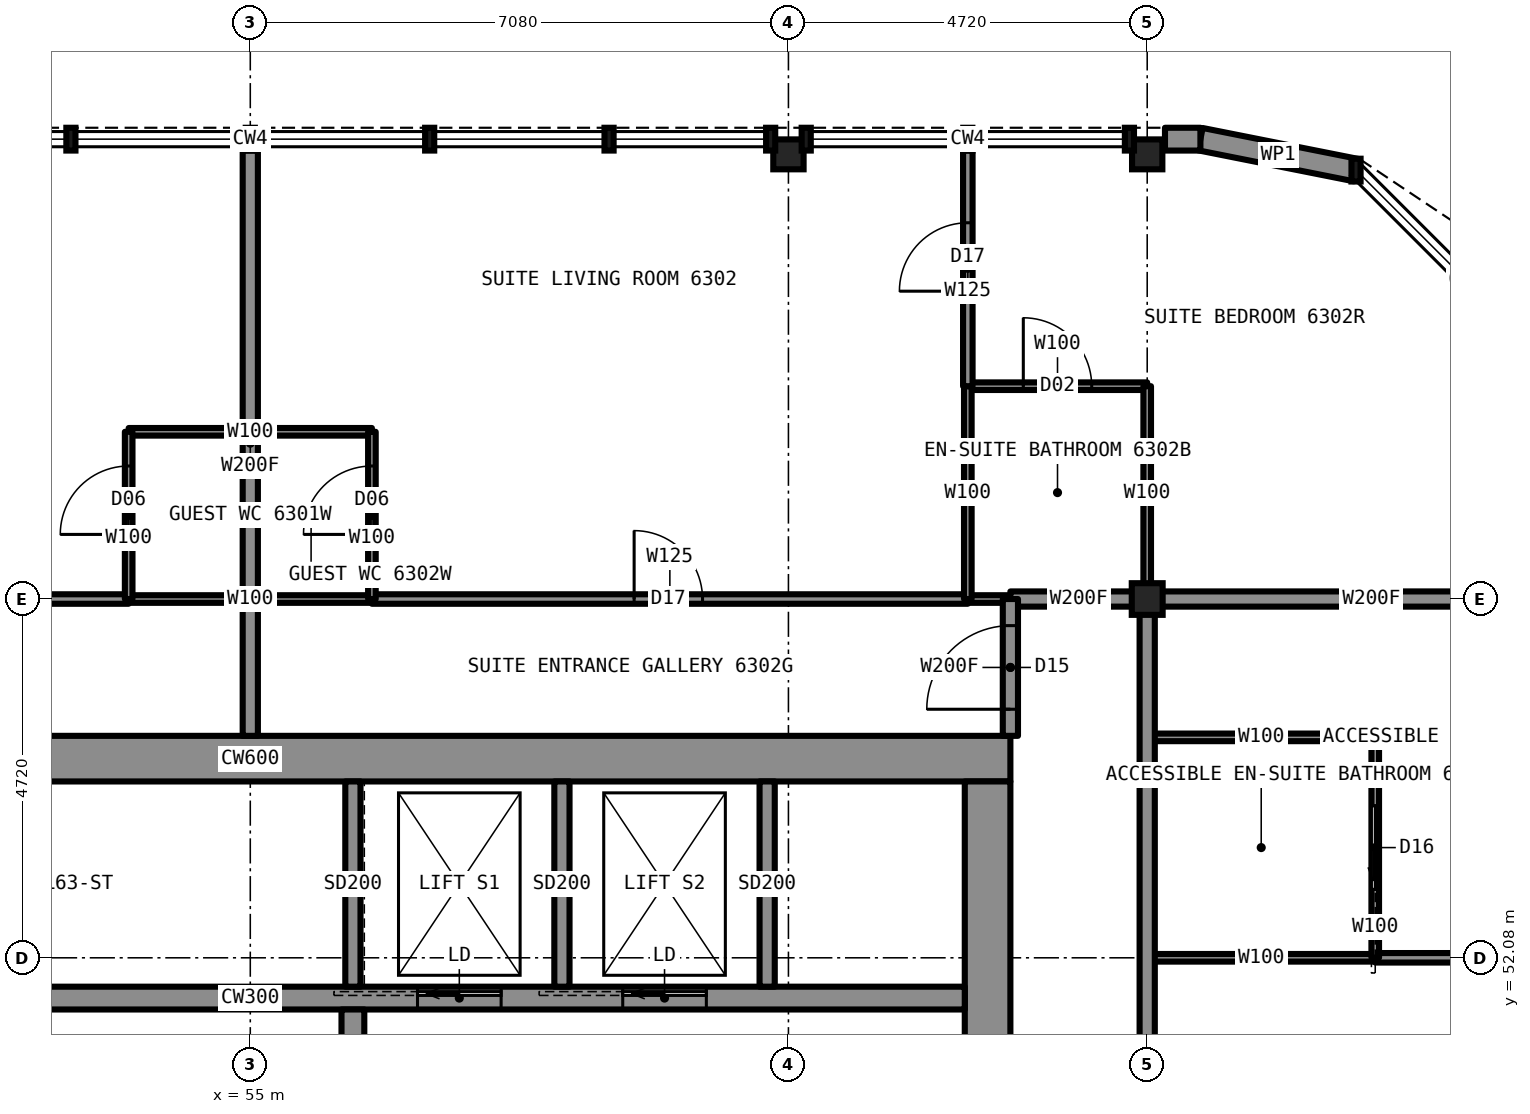
"""IFC4 building model, lengths in metres.
Left out: names, types, materials, properties, quantities, classifications, styles, units other than length and angle.
Written with IfcOpenShell. Run it as: python <this file> out.ifc"""

import sys

from ifc_helpers import new_model, si_unit, direction, frame, frame_2d, origin, origin_2d, place, context, subcontext, project, spatial, rectangle, i_section, extrude, element, fill, save


model = new_model("IFC4")
c1 = context("Model", 3, precision=1e-05, world=origin(), true_north=direction((0.0, 1.0)))
c2 = subcontext(c1, "Body", "Model", "MODEL_VIEW")
j1 = project(units=[si_unit("LENGTHUNIT", "METRE"), si_unit("PLANEANGLEUNIT", "RADIAN")], contexts=[c1])
p1 = place(None, origin())
s1 = spatial("IfcSite", under=j1, at=p1, CompositionType="ELEMENT")
p2 = place(p1, origin())
s2 = spatial("IfcBuilding", under=s1, at=p2, CompositionType="ELEMENT")
p3 = place(p2, frame((0.0, 0.0, 226.7)))
s3 = spatial("IfcBuildingStorey", under=s2, at=p3, CompositionType="ELEMENT", Elevation=226.7)
for number, where, z_axis, x_axis in (
    (1, (62.08, 62.65, 0.0), (0.0, 0.0, 1.0), (1.0, 0.0, 0.0)),
    (2, (66.8, 62.65, 0.0), (0.0, 0.0, 1.0), (1.0, 0.0, 0.0)),
):
    element("IfcColumn", number, at=place(p3, frame(where, z_axis=z_axis, x_axis=x_axis)), inside=s3, PredefinedType="COLUMN", context=c2, shape_type="SweptSolid", body=[
        extrude(i_section(OverallWidth=0.442, OverallDepth=0.531, WebThickness=0.066, FlangeThickness=0.106, at=origin_2d()), origin(), (0.0, 0.0, 1.0), 3.5),
    ])
p4 = place(p3, frame((66.8, 56.8, 0.0), z_axis=(0.0, 0.0, 1.0), x_axis=(1.0, 0.0, 0.0)))
e3 = element("IfcColumn", 3, at=p4, inside=s3, PredefinedType="COLUMN", context=c2, shape_type="SweptSolid", body=[
    extrude(i_section(OverallWidth=0.406, OverallDepth=0.417, WebThickness=0.03, FlangeThickness=0.048, at=origin_2d()), origin(), (0.0, 0.0, 1.0), 3.5),
])
p5 = place(p3, frame((45.0, 54.7, 0.0), z_axis=(0.0, 0.0, 1.0), x_axis=(1.0, 0.0, 0.0)))
e4 = element("IfcWall", 4, at=p5, inside=s3, PredefinedType="SHEAR", context=c2, shape_type="SweptSolid", body=[
    extrude(rectangle(XDim=20.0, YDim=0.6, at=frame_2d((10.0, 0.0))), origin(), (0.0, 0.0, 1.0), 3.5),
])
p6 = place(p3, frame((64.7, 35.6, 0.0), z_axis=(0.0, 0.0, 1.0), x_axis=(0.0, 1.0, 0.0)))
e5 = element("IfcWall", 5, at=p6, inside=s3, PredefinedType="SHEAR", context=c2, shape_type="SweptSolid", body=[
    extrude(rectangle(XDim=18.8, YDim=0.6, at=frame_2d((9.4, 0.0))), origin(), (0.0, 0.0, 1.0), 3.5),
])
p7 = place(p6, frame((13.4, 0.0, 0.0)))
e6 = element("IfcOpeningElement", 6, at=p7, cuts=e5, PredefinedType="OPENING", context=c2, shape_type="SweptSolid", body=[
    extrude(rectangle(XDim=1.8, YDim=2.2, at=frame_2d((0.9, 1.1))), frame((0.0, 0.31, 0.0), z_axis=(0.0, -1.0, 0.0), x_axis=(1.0, 0.0, 0.0)), (0.0, 0.0, 1.0), 0.62),
])
p8 = place(p6, frame((3.6, 0.0, 0.0)))
e7 = element("IfcOpeningElement", 7, at=p8, cuts=e5, PredefinedType="OPENING", context=c2, shape_type="SweptSolid", body=[
    extrude(rectangle(XDim=1.8, YDim=2.2, at=frame_2d((0.9, 1.1))), frame((0.0, 0.31, 0.0), z_axis=(0.0, -1.0, 0.0), x_axis=(1.0, 0.0, 0.0)), (0.0, 0.0, 1.0), 0.62),
])
p9 = place(p3, frame((45.6, 51.55, 0.0), z_axis=(0.0, 0.0, 1.0), x_axis=(1.0, 0.0, 0.0)))
e8 = element("IfcWall", 8, at=p9, inside=s3, PredefinedType="SHEAR", context=c2, shape_type="SweptSolid", body=[
    extrude(rectangle(XDim=18.8, YDim=0.3, at=frame_2d((9.4, 0.0))), origin(), (0.0, 0.0, 1.0), 3.5),
])
p10 = place(p9, frame((4.8, 0.0, 0.0)))
e9 = element("IfcOpeningElement", 9, at=p10, cuts=e8, PredefinedType="OPENING", context=c2, shape_type="SweptSolid", body=[
    extrude(rectangle(XDim=1.0, YDim=2.1, at=frame_2d((0.5, 1.05))), frame((0.0, 0.16, 0.0), z_axis=(0.0, -1.0, 0.0), x_axis=(1.0, 0.0, 0.0)), (0.0, 0.0, 1.0), 0.32),
])
p11 = place(p9, frame((11.6, 0.0, 0.0)))
e10 = element("IfcOpeningElement", 10, at=p11, cuts=e8, PredefinedType="OPENING", context=c2, shape_type="SweptSolid", body=[
    extrude(rectangle(XDim=1.1, YDim=2.2, at=frame_2d((0.55, 1.1))), frame((0.0, 0.16, 0.0), z_axis=(0.0, -1.0, 0.0), x_axis=(1.0, 0.0, 0.0)), (0.0, 0.0, 1.0), 0.32),
])
p12 = place(p9, frame((14.3, 0.0, 0.0)))
e11 = element("IfcOpeningElement", 11, at=p12, cuts=e8, PredefinedType="OPENING", context=c2, shape_type="SweptSolid", body=[
    extrude(rectangle(XDim=1.1, YDim=2.2, at=frame_2d((0.55, 1.1))), frame((0.0, 0.16, 0.0), z_axis=(0.0, -1.0, 0.0), x_axis=(1.0, 0.0, 0.0)), (0.0, 0.0, 1.0), 0.32),
])
p13 = place(p3, frame((56.35, 41.9, 0.0), z_axis=(0.0, 0.0, 1.0), x_axis=(0.0, 1.0, 0.0)))
e12 = element("IfcWall", 12, at=p13, inside=s3, PredefinedType="SHEAR", context=c2, shape_type="SweptSolid", body=[
    extrude(rectangle(XDim=9.5, YDim=0.3, at=frame_2d((4.75, 0.0))), origin(), (0.0, 0.0, 1.0), 3.5),
])
p14 = place(p13, frame((7.1, 0.0, 0.0)))
e13 = element("IfcOpeningElement", 13, at=p14, cuts=e12, PredefinedType="OPENING", context=c2, shape_type="SweptSolid", body=[
    extrude(rectangle(XDim=1.8, YDim=2.2, at=frame_2d((0.9, 1.1))), frame((0.0, 0.16, 0.0), z_axis=(0.0, -1.0, 0.0), x_axis=(1.0, 0.0, 0.0)), (0.0, 0.0, 1.0), 0.32),
])
p15 = place(p3, frame((53.4, 56.8, 0.0), z_axis=(0.0, 0.0, 1.0), x_axis=(1.0, 0.0, 0.0)))
e14 = element("IfcWall", 14, at=p15, inside=s3, PredefinedType="PARTITIONING", context=c2, shape_type="SweptSolid", body=[
    extrude(rectangle(XDim=3.2, YDim=0.1, at=frame_2d((1.6, 0.0))), origin(), (0.0, 0.0, 1.0), 3.33),
])
p16 = place(p3, frame((64.44, 56.8, 0.0), z_axis=(0.0, 0.0, 1.0), x_axis=(1.0, 0.0, 0.0)))
e15 = element("IfcWall", 15, at=p16, inside=s3, PredefinedType="PARTITIONING", context=c2, shape_type="SweptSolid", body=[
    extrude(rectangle(XDim=0.56, YDim=0.1, at=frame_2d((0.28, 0.0))), origin(), (0.0, 0.0, 1.0), 3.33),
])
p17 = place(p3, frame((65.0, 56.8, 0.0), z_axis=(0.0, 0.0, 1.0), x_axis=(1.0, 0.0, 0.0)))
e16 = element("IfcWall", 16, at=p17, inside=s3, PredefinedType="PARTITIONING", context=c2, shape_type="SweptSolid", body=[
    extrude(rectangle(XDim=1.8, YDim=0.2, at=frame_2d((0.9, 0.0))), origin(), (0.0, 0.0, 1.0), 3.33),
])
p18 = place(p3, frame((66.8, 56.8, 0.0), z_axis=(0.0, 0.0, 1.0), x_axis=(1.0, 0.0, 0.0)))
e17 = element("IfcWall", 17, at=p18, inside=s3, PredefinedType="PARTITIONING", context=c2, shape_type="SweptSolid", body=[
    extrude(rectangle(XDim=5.9, YDim=0.2, at=frame_2d((2.95, 0.0))), origin(), (0.0, 0.0, 1.0), 2.573),
])
p19 = place(p3, frame((45.56, 56.8, 0.0), z_axis=(0.0, 0.0, 1.0), x_axis=(1.0, 0.0, 0.0)))
e18 = element("IfcWall", 18, at=p19, inside=s3, PredefinedType="PARTITIONING", context=c2, shape_type="SweptSolid", body=[
    extrude(rectangle(XDim=7.84, YDim=0.125, at=frame_2d((3.92, 0.0))), origin(), (0.0, 0.0, 1.0), 3.33),
])
p20 = place(p19, frame((3.49, 0.0, 0.0)))
e19 = element("IfcOpeningElement", 19, at=p20, cuts=e18, PredefinedType="OPENING", context=c2, shape_type="SweptSolid", body=[
    extrude(rectangle(XDim=0.9, YDim=2.2, at=frame_2d((0.45, 1.1))), frame((0.0, 0.073, 0.0), z_axis=(0.0, -1.0, 0.0), x_axis=(1.0, 0.0, 0.0)), (0.0, 0.0, 1.0), 0.145),
])
p21 = place(p3, frame((56.6, 56.8, 0.0), z_axis=(0.0, 0.0, 1.0), x_axis=(1.0, 0.0, 0.0)))
e20 = element("IfcWall", 20, at=p21, inside=s3, PredefinedType="PARTITIONING", context=c2, shape_type="SweptSolid", body=[
    extrude(rectangle(XDim=7.84, YDim=0.125, at=frame_2d((3.92, 0.0))), origin(), (0.0, 0.0, 1.0), 3.33),
])
p22 = place(p21, frame((3.45, 0.0, 0.0)))
e21 = element("IfcOpeningElement", 21, at=p22, cuts=e20, PredefinedType="OPENING", context=c2, shape_type="SweptSolid", body=[
    extrude(rectangle(XDim=0.9, YDim=2.2, at=frame_2d((0.45, 1.1))), frame((0.0, 0.073, 0.0), z_axis=(0.0, -1.0, 0.0), x_axis=(1.0, 0.0, 0.0)), (0.0, 0.0, 1.0), 0.145),
])
p23 = place(p3, frame((53.4, 59.0, 0.0), z_axis=(0.0, 0.0, 1.0), x_axis=(1.0, 0.0, 0.0)))
e22 = element("IfcWall", 22, at=p23, inside=s3, PredefinedType="PARTITIONING", context=c2, shape_type="SweptSolid", body=[
    extrude(rectangle(XDim=3.2, YDim=0.1, at=frame_2d((1.6, 0.0))), origin(), (0.0, 0.0, 1.0), 3.33),
])
p24 = place(p3, frame((64.44, 59.6, 0.0), z_axis=(0.0, 0.0, 1.0), x_axis=(1.0, 0.0, 0.0)))
e23 = element("IfcWall", 23, at=p24, inside=s3, PredefinedType="PARTITIONING", context=c2, shape_type="SweptSolid", body=[
    extrude(rectangle(XDim=2.36, YDim=0.1, at=frame_2d((1.18, 0.0))), origin(), (0.0, 0.0, 1.0), 3.33),
])
p25 = place(p24, frame((0.73, 0.0, 0.0)))
e24 = element("IfcOpeningElement", 24, at=p25, cuts=e23, PredefinedType="OPENING", context=c2, shape_type="SweptSolid", body=[
    extrude(rectangle(XDim=0.9, YDim=2.1, at=frame_2d((0.45, 1.05))), frame((0.0, 0.06, 0.0), z_axis=(0.0, -1.0, 0.0), x_axis=(1.0, 0.0, 0.0)), (0.0, 0.0, 1.0), 0.12),
])
p26 = place(p3, frame((66.8, 52.08, 0.0), z_axis=(0.0, 0.0, 1.0), x_axis=(1.0, 0.0, 0.0)))
e25 = element("IfcWall", 25, at=p26, inside=s3, PredefinedType="PARTITIONING", context=c2, shape_type="SweptSolid", body=[
    extrude(rectangle(XDim=3.0, YDim=0.1, at=frame_2d((1.5, 0.0))), origin(), (0.0, 0.0, 1.0), 2.573),
])
p27 = place(p3, frame((69.8, 52.08, 0.0), z_axis=(0.0, 0.0, 1.0), x_axis=(1.0, 0.0, 0.0)))
e26 = element("IfcWall", 26, at=p27, inside=s3, PredefinedType="PARTITIONING", context=c2, shape_type="SweptSolid", body=[
    extrude(rectangle(XDim=2.9, YDim=0.125, at=frame_2d((1.45, 0.0))), origin(), (0.0, 0.0, 1.0), 2.573),
])
p28 = place(p27, frame((1.05, 0.0, 0.0)))
e27 = element("IfcOpeningElement", 27, at=p28, cuts=e26, PredefinedType="OPENING", context=c2, shape_type="SweptSolid", body=[
    extrude(rectangle(XDim=0.9, YDim=2.2, at=frame_2d((0.45, 1.1))), frame((0.0, 0.073, 0.0), z_axis=(0.0, -1.0, 0.0), x_axis=(1.0, 0.0, 0.0)), (0.0, 0.0, 1.0), 0.145),
])
p29 = place(p3, frame((66.8, 54.98, 0.0), z_axis=(0.0, 0.0, 1.0), x_axis=(1.0, 0.0, 0.0)))
e28 = element("IfcWall", 28, at=p29, inside=s3, PredefinedType="PARTITIONING", context=c2, shape_type="SweptSolid", body=[
    extrude(rectangle(XDim=3.0, YDim=0.1, at=frame_2d((1.5, 0.0))), origin(), (0.0, 0.0, 1.0), 3.33),
])
p30 = place(p3, frame((53.4, 56.8, 0.0), z_axis=(0.0, 0.0, 1.0), x_axis=(0.0, 1.0, 0.0)))
e29 = element("IfcWall", 29, at=p30, inside=s3, PredefinedType="PARTITIONING", context=c2, shape_type="SweptSolid", body=[
    extrude(rectangle(XDim=2.2, YDim=0.1, at=frame_2d((1.1, 0.0))), origin(), (0.0, 0.0, 1.0), 3.33),
])
p31 = place(p30, frame((0.85, 0.0, 0.0)))
e30 = element("IfcOpeningElement", 30, at=p31, cuts=e29, PredefinedType="OPENING", context=c2, shape_type="SweptSolid", body=[
    extrude(rectangle(XDim=0.9, YDim=2.1, at=frame_2d((0.45, 1.05))), frame((0.0, 0.06, 0.0), z_axis=(0.0, -1.0, 0.0), x_axis=(1.0, 0.0, 0.0)), (0.0, 0.0, 1.0), 0.12),
])
p32 = place(p3, frame((55.0, 55.0, 0.0), z_axis=(0.0, 0.0, 1.0), x_axis=(0.0, 1.0, 0.0)))
e31 = element("IfcWall", 31, at=p32, inside=s3, PredefinedType="PARTITIONING", context=c2, shape_type="SweptSolid", body=[
    extrude(rectangle(XDim=7.7, YDim=0.2, at=frame_2d((3.85, 0.0))), origin(), (0.0, 0.0, 1.0), 2.573),
])
p33 = place(p3, frame((56.6, 56.8, 0.0), z_axis=(0.0, 0.0, 1.0), x_axis=(0.0, 1.0, 0.0)))
e32 = element("IfcWall", 32, at=p33, inside=s3, PredefinedType="PARTITIONING", context=c2, shape_type="SweptSolid", body=[
    extrude(rectangle(XDim=2.2, YDim=0.1, at=frame_2d((1.1, 0.0))), origin(), (0.0, 0.0, 1.0), 3.33),
])
p34 = place(p33, frame((0.85, 0.0, 0.0)))
e33 = element("IfcOpeningElement", 33, at=p34, cuts=e32, PredefinedType="OPENING", context=c2, shape_type="SweptSolid", body=[
    extrude(rectangle(XDim=0.9, YDim=2.1, at=frame_2d((0.45, 1.05))), frame((0.0, 0.06, 0.0), z_axis=(0.0, -1.0, 0.0), x_axis=(1.0, 0.0, 0.0)), (0.0, 0.0, 1.0), 0.12),
])
p35 = place(p3, frame((65.0, 55.0, 0.0), z_axis=(0.0, 0.0, 1.0), x_axis=(0.0, 1.0, 0.0)))
e34 = element("IfcWall", 34, at=p35, inside=s3, PredefinedType="PARTITIONING", context=c2, shape_type="SweptSolid", body=[
    extrude(rectangle(XDim=1.8, YDim=0.2, at=frame_2d((0.9, 0.0))), origin(), (0.0, 0.0, 1.0), 3.33),
])
p36 = place(p35, frame((0.35, 0.0, 0.0)))
e35 = element("IfcOpeningElement", 35, at=p36, cuts=e34, PredefinedType="OPENING", context=c2, shape_type="SweptSolid", body=[
    extrude(rectangle(XDim=1.1, YDim=2.2, at=frame_2d((0.55, 1.1))), frame((0.0, 0.11, 0.0), z_axis=(0.0, -1.0, 0.0), x_axis=(1.0, 0.0, 0.0)), (0.0, 0.0, 1.0), 0.22),
])
p37 = place(p3, frame((66.8, 56.8, 0.0), z_axis=(0.0, 0.0, 1.0), x_axis=(0.0, 1.0, 0.0)))
e36 = element("IfcWall", 36, at=p37, inside=s3, PredefinedType="PARTITIONING", context=c2, shape_type="SweptSolid", body=[
    extrude(rectangle(XDim=2.8, YDim=0.1, at=frame_2d((1.4, 0.0))), origin(), (0.0, 0.0, 1.0), 2.573),
])
p38 = place(p3, frame((66.8, 33.2, 0.0), z_axis=(0.0, 0.0, 1.0), x_axis=(0.0, 1.0, 0.0)))
e37 = element("IfcWall", 37, at=p38, inside=s3, PredefinedType="PARTITIONING", context=c2, shape_type="SweptSolid", body=[
    extrude(rectangle(XDim=23.6, YDim=0.2, at=frame_2d((11.8, 0.0))), origin(), (0.0, 0.0, 1.0), 3.33),
])
p39 = place(p38, frame((8.85, 0.0, 0.0)))
e38 = element("IfcOpeningElement", 38, at=p39, cuts=e37, PredefinedType="OPENING", context=c2, shape_type="SweptSolid", body=[
    extrude(rectangle(XDim=1.1, YDim=2.2, at=frame_2d((0.55, 1.1))), frame((0.0, 0.11, 0.0), z_axis=(0.0, -1.0, 0.0), x_axis=(1.0, 0.0, 0.0)), (0.0, 0.0, 1.0), 0.22),
])
p40 = place(p38, frame((13.65, 0.0, 0.0)))
e39 = element("IfcOpeningElement", 39, at=p40, cuts=e37, PredefinedType="OPENING", context=c2, shape_type="SweptSolid", body=[
    extrude(rectangle(XDim=1.1, YDim=2.2, at=frame_2d((0.55, 1.1))), frame((0.0, 0.11, 0.0), z_axis=(0.0, -1.0, 0.0), x_axis=(1.0, 0.0, 0.0)), (0.0, 0.0, 1.0), 0.22),
])
p41 = place(p3, frame((69.8, 52.08, 0.0), z_axis=(0.0, 0.0, 1.0), x_axis=(0.0, 1.0, 0.0)))
e40 = element("IfcWall", 40, at=p41, inside=s3, PredefinedType="PARTITIONING", context=c2, shape_type="SweptSolid", body=[
    extrude(rectangle(XDim=2.9, YDim=0.1, at=frame_2d((1.45, 0.0))), origin(), (0.0, 0.0, 1.0), 3.33),
])
p42 = place(p41, frame((0.9, 0.0, 0.0)))
e41 = element("IfcOpeningElement", 41, at=p42, cuts=e40, PredefinedType="OPENING", context=c2, shape_type="SweptSolid", body=[
    extrude(rectangle(XDim=1.1, YDim=2.1, at=frame_2d((0.55, 1.05))), frame((0.0, 0.06, 0.0), z_axis=(0.0, -1.0, 0.0), x_axis=(1.0, 0.0, 0.0)), (0.0, 0.0, 1.0), 0.12),
])
p43 = place(p3, frame((64.44, 56.8, 0.0), z_axis=(0.0, 0.0, 1.0), x_axis=(0.0, 1.0, 0.0)))
e42 = element("IfcWall", 42, at=p43, inside=s3, PredefinedType="PARTITIONING", context=c2, shape_type="SweptSolid", body=[
    extrude(rectangle(XDim=2.8, YDim=0.1, at=frame_2d((1.4, 0.0))), origin(), (0.0, 0.0, 1.0), 3.33),
])
p44 = place(p3, frame((64.44, 59.6, 0.0), z_axis=(0.0, 0.0, 1.0), x_axis=(0.0, 1.0, 0.0)))
e43 = element("IfcWall", 43, at=p44, inside=s3, PredefinedType="PARTITIONING", context=c2, shape_type="SweptSolid", body=[
    extrude(rectangle(XDim=3.1, YDim=0.125, at=frame_2d((1.55, 0.0))), origin(), (0.0, 0.0, 1.0), 3.33),
])
p45 = place(p44, frame((1.25, 0.0, 0.0)))
e44 = element("IfcOpeningElement", 44, at=p45, cuts=e43, PredefinedType="OPENING", context=c2, shape_type="SweptSolid", body=[
    extrude(rectangle(XDim=0.9, YDim=2.2, at=frame_2d((0.45, 1.1))), frame((0.0, 0.073, 0.0), z_axis=(0.0, -1.0, 0.0), x_axis=(1.0, 0.0, 0.0)), (0.0, 0.0, 1.0), 0.145),
])
for number, where, z_axis, x_axis in (
    (45, (59.1, 51.7, 0.0), (0.0, 0.0, 1.0), (0.0, 1.0, 0.0)),
    (46, (61.8, 51.7, 0.0), (0.0, 0.0, 1.0), (0.0, 1.0, 0.0)),
    (47, (56.35, 51.7, 0.0), (0.0, 0.0, 1.0), (0.0, 1.0, 0.0)),
):
    element("IfcWall", number, at=place(p3, frame(where, z_axis=z_axis, x_axis=x_axis)), inside=s3, PredefinedType="PARTITIONING", context=c2, shape_type="SweptSolid", body=[
        extrude(rectangle(XDim=2.7, YDim=0.2, at=frame_2d((1.35, 0.0))), origin(), (0.0, 0.0, 1.0), 3.33),
    ])
p46 = place(p3, frame((71.283, 61.283, 0.0), z_axis=(0.0, 0.0, 1.0), x_axis=(-0.831420010345, 0.555644460423, 0.0)))
e48 = element("IfcWall", 48, at=p46, inside=s3, PredefinedType="SOLIDWALL", context=c2, shape_type="SweptSolid", body=[
    extrude(rectangle(XDim=2.087, YDim=0.3, at=frame_2d((1.044, 0.0))), origin(), (0.0, 0.0, 1.0), 2.83),
])
p47 = place(p31, origin())
e49 = element("IfcDoor", 49, at=p47, inside=s3, OperationType="SINGLE_SWING_LEFT", PredefinedType="DOOR", context=c2, shape_type="SweptSolid", body=[
    extrude(rectangle(XDim=0.9, YDim=2.1, at=frame_2d((0.45, 1.05))), frame((0.0, 0.025, 0.0), z_axis=(0.0, -1.0, 0.0), x_axis=(1.0, 0.0, 0.0)), (0.0, 0.0, 1.0), 0.05),
])
fill(e30, e49)
p48 = place(p22, origin())
e50 = element("IfcDoor", 50, at=p48, inside=s3, OperationType="SINGLE_SWING_LEFT", PredefinedType="DOOR", context=c2, shape_type="SweptSolid", body=[
    extrude(rectangle(XDim=0.9, YDim=2.2, at=frame_2d((0.45, 1.1))), frame((0.0, 0.025, 0.0), z_axis=(0.0, -1.0, 0.0), x_axis=(1.0, 0.0, 0.0)), (0.0, 0.0, 1.0), 0.05),
])
fill(e21, e50)
p49 = place(p25, origin())
e51 = element("IfcDoor", 51, at=p49, inside=s3, OperationType="SINGLE_SWING_RIGHT", PredefinedType="DOOR", context=c2, shape_type="SweptSolid", body=[
    extrude(rectangle(XDim=0.9, YDim=2.1, at=frame_2d((0.45, 1.05))), frame((0.0, 0.025, 0.0), z_axis=(0.0, -1.0, 0.0), x_axis=(1.0, 0.0, 0.0)), (0.0, 0.0, 1.0), 0.05),
])
fill(e24, e51)
p50 = place(p36, origin())
e52 = element("IfcDoor", 52, at=p50, inside=s3, OperationType="SINGLE_SWING_LEFT", PredefinedType="DOOR", context=c2, shape_type="SweptSolid", body=[
    extrude(rectangle(XDim=1.1, YDim=2.2, at=frame_2d((0.55, 1.1))), frame((0.0, 0.025, 0.0), z_axis=(0.0, -1.0, 0.0), x_axis=(1.0, 0.0, 0.0)), (0.0, 0.0, 1.0), 0.05),
])
fill(e35, e52)
p51 = place(p45, origin())
e53 = element("IfcDoor", 53, at=p51, inside=s3, OperationType="SINGLE_SWING_LEFT", PredefinedType="DOOR", context=c2, shape_type="SweptSolid", body=[
    extrude(rectangle(XDim=0.9, YDim=2.2, at=frame_2d((0.45, 1.1))), frame((0.0, 0.025, 0.0), z_axis=(0.0, -1.0, 0.0), x_axis=(1.0, 0.0, 0.0)), (0.0, 0.0, 1.0), 0.05),
])
fill(e44, e53)
p52 = place(p34, origin())
e54 = element("IfcDoor", 54, at=p52, inside=s3, OperationType="SINGLE_SWING_LEFT", PredefinedType="DOOR", context=c2, shape_type="SweptSolid", body=[
    extrude(rectangle(XDim=0.9, YDim=2.1, at=frame_2d((0.45, 1.05))), frame((0.0, 0.025, 0.0), z_axis=(0.0, -1.0, 0.0), x_axis=(1.0, 0.0, 0.0)), (0.0, 0.0, 1.0), 0.05),
])
fill(e33, e54)
p53 = place(p42, origin())
e55 = element("IfcDoor", 55, at=p53, inside=s3, OperationType="SLIDING_TO_LEFT", PredefinedType="DOOR", context=c2, shape_type="SweptSolid", body=[
    extrude(rectangle(XDim=1.1, YDim=2.1, at=frame_2d((0.55, 1.05))), frame((0.0, 0.025, 0.0), z_axis=(0.0, -1.0, 0.0), x_axis=(1.0, 0.0, 0.0)), (0.0, 0.0, 1.0), 0.05),
])
fill(e41, e55)
p54 = place(p11, origin())
e56 = element("IfcDoor", 56, at=p54, inside=s3, OperationType="SLIDING_TO_LEFT", PredefinedType="DOOR", context=c2, shape_type="SweptSolid", body=[
    extrude(rectangle(XDim=1.1, YDim=2.2, at=frame_2d((0.55, 1.1))), frame((0.0, 0.025, 0.0), z_axis=(0.0, -1.0, 0.0), x_axis=(1.0, 0.0, 0.0)), (0.0, 0.0, 1.0), 0.05),
])
fill(e10, e56)
p55 = place(p12, origin())
e57 = element("IfcDoor", 57, at=p55, inside=s3, OperationType="SLIDING_TO_LEFT", PredefinedType="DOOR", context=c2, shape_type="SweptSolid", body=[
    extrude(rectangle(XDim=1.1, YDim=2.2, at=frame_2d((0.55, 1.1))), frame((0.0, 0.025, 0.0), z_axis=(0.0, -1.0, 0.0), x_axis=(1.0, 0.0, 0.0)), (0.0, 0.0, 1.0), 0.05),
])
fill(e11, e57)
save(model, sys.argv[1])
